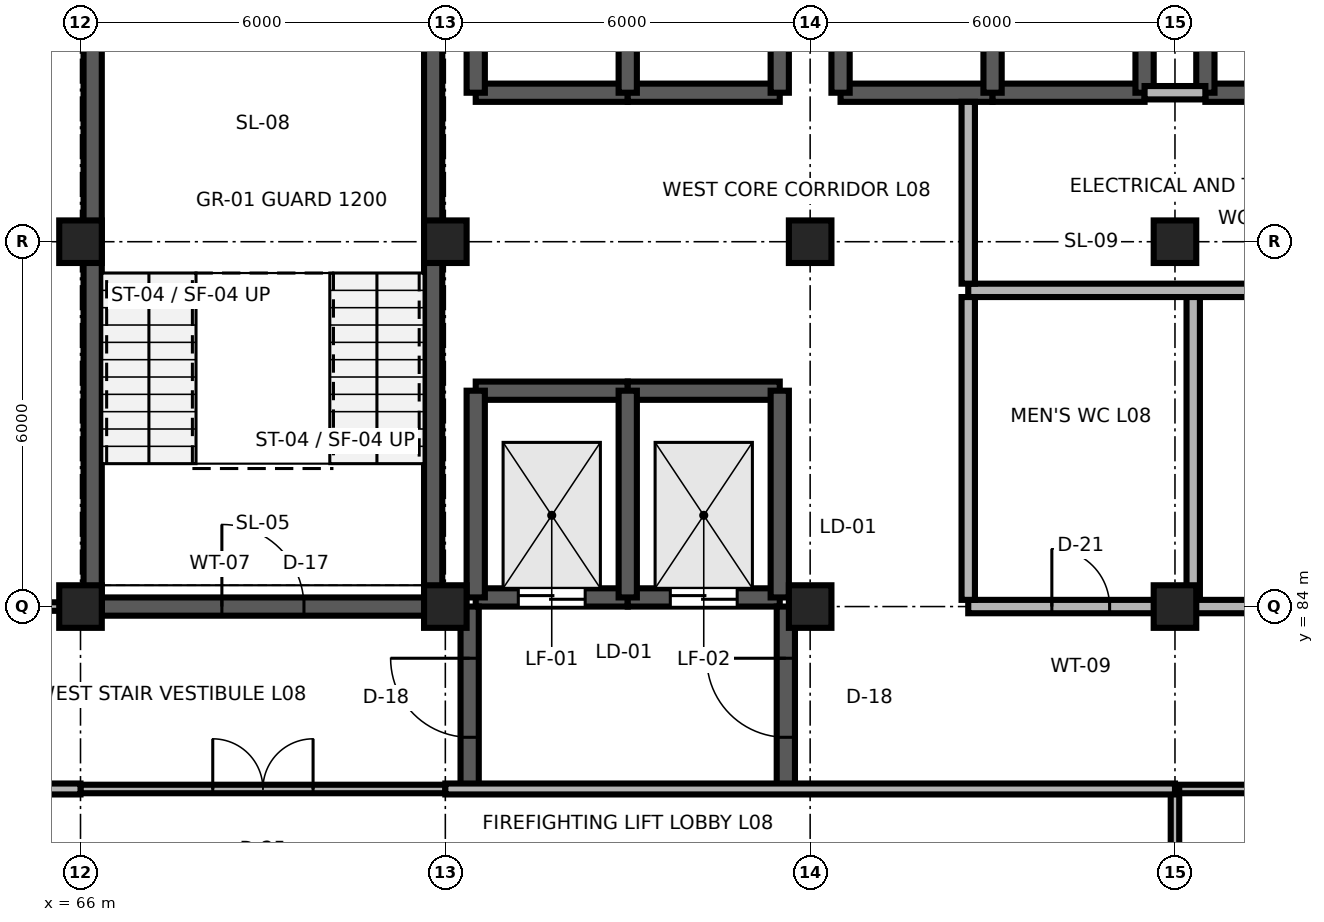
"""IFC4 building model, lengths in metres.
Left out: names, types, materials, properties, quantities, classifications, styles, units other than length and angle.
Written with IfcOpenShell. Run it as: python <this file> out.ifc"""

import sys

from ifc_helpers import new_model, si_unit, direction, frame, frame_2d, origin, origin_2d, place, context, subcontext, project, spatial, rectangle, extrude, element, fill, save


model = new_model("IFC4")
c1 = context("Model", 3, precision=1e-05, world=origin(), true_north=direction((0.0, 1.0)))
c2 = subcontext(c1, "Body", "Model", "MODEL_VIEW")
j1 = project(units=[si_unit("LENGTHUNIT", "METRE"), si_unit("PLANEANGLEUNIT", "RADIAN")], contexts=[c1])
p1 = place(None, origin())
s1 = spatial("IfcSite", under=j1, at=p1, CompositionType="ELEMENT")
p2 = place(p1, origin())
s2 = spatial("IfcBuilding", under=s1, at=p2, CompositionType="ELEMENT")
p3 = place(p2, frame((0.0, 0.0, 32.7)))
s3 = spatial("IfcBuildingStorey", under=s2, at=p3, CompositionType="ELEMENT", Elevation=32.7)
for number, where, z_axis, x_axis in (
    (1, (66.0, 84.0, 0.0), (0.0, 0.0, 1.0), (1.0, 0.0, 0.0)),
    (2, (72.0, 84.0, 0.0), (0.0, 0.0, 1.0), (1.0, 0.0, 0.0)),
    (3, (78.0, 84.0, 0.0), (0.0, 0.0, 1.0), (1.0, 0.0, 0.0)),
    (4, (84.0, 84.0, 0.0), (0.0, 0.0, 1.0), (1.0, 0.0, 0.0)),
    (5, (66.0, 90.0, 0.0), (0.0, 0.0, 1.0), (1.0, 0.0, 0.0)),
    (6, (72.0, 90.0, 0.0), (0.0, 0.0, 1.0), (1.0, 0.0, 0.0)),
    (7, (78.0, 90.0, 0.0), (0.0, 0.0, 1.0), (1.0, 0.0, 0.0)),
    (8, (84.0, 90.0, 0.0), (0.0, 0.0, 1.0), (1.0, 0.0, 0.0)),
):
    element("IfcColumn", number, at=place(p3, frame(where, z_axis=z_axis, x_axis=x_axis)), inside=s3, PredefinedType="COLUMN", context=c2, shape_type="SweptSolid", body=[
        extrude(rectangle(XDim=0.7, YDim=0.7, at=origin_2d()), origin(), (0.0, 0.0, 1.0), 3.9),
    ])
p4 = place(p3, frame((66.35, 84.0, 0.0), z_axis=(0.0, 0.0, 1.0), x_axis=(1.0, 0.0, 0.0)))
e9 = element("IfcWall", 9, at=p4, inside=s3, PredefinedType="SHEAR", context=c2, shape_type="SweptSolid", body=[
    extrude(rectangle(XDim=5.3, YDim=0.3, at=frame_2d((2.65, 0.0))), origin(), (0.0, 0.0, 1.0), 3.66),
])
p5 = place(p4, frame((1.975, 0.0, 0.0)))
e10 = element("IfcOpeningElement", 10, at=p5, cuts=e9, PredefinedType="OPENING", context=c2, shape_type="SweptSolid", body=[
    extrude(rectangle(XDim=1.35, YDim=2.2, at=frame_2d((0.675, 1.1))), frame((0.0, 0.165, 0.0), z_axis=(0.0, -1.0, 0.0), x_axis=(1.0, 0.0, 0.0)), (0.0, 0.0, 1.0), 0.33),
])
for number, where, z_axis, x_axis in (
    (11, (66.2, 84.0, 0.0), (0.0, 0.0, 1.0), (0.0, 1.0, 0.0)),
    (12, (71.8, 84.0, 0.0), (0.0, 0.0, 1.0), (0.0, 1.0, 0.0)),
):
    element("IfcWall", number, at=place(p3, frame(where, z_axis=z_axis, x_axis=x_axis)), inside=s3, PredefinedType="SHEAR", context=c2, shape_type="SweptSolid", body=[
        extrude(rectangle(XDim=11.8, YDim=0.3, at=frame_2d((5.9, 0.0))), origin(), (0.0, 0.0, 1.0), 3.74),
    ])
p6 = place(p3, frame((72.5, 84.15, 0.0), z_axis=(0.0, 0.0, 1.0), x_axis=(1.0, 0.0, 0.0)))
e13 = element("IfcWall", 13, at=p6, inside=s3, PredefinedType="SHEAR", context=c2, shape_type="SweptSolid", body=[
    extrude(rectangle(XDim=2.5, YDim=0.3, at=frame_2d((1.25, 0.0))), origin(), (0.0, 0.0, 1.0), 3.74),
])
p7 = place(p6, frame((0.7, 0.0, 0.0)))
e14 = element("IfcOpeningElement", 14, at=p7, cuts=e13, PredefinedType="OPENING", context=c2, shape_type="SweptSolid", body=[
    extrude(rectangle(XDim=1.1, YDim=2.1, at=frame_2d((0.55, 1.05))), frame((0.0, 0.165, 0.0), z_axis=(0.0, -1.0, 0.0), x_axis=(1.0, 0.0, 0.0)), (0.0, 0.0, 1.0), 0.33),
])
p8 = place(p3, frame((72.5, 87.55, 0.0), z_axis=(0.0, 0.0, 1.0), x_axis=(1.0, 0.0, 0.0)))
e15 = element("IfcWall", 15, at=p8, inside=s3, PredefinedType="SHEAR", context=c2, shape_type="SweptSolid", body=[
    extrude(rectangle(XDim=2.5, YDim=0.3, at=frame_2d((1.25, 0.0))), origin(), (0.0, 0.0, 1.0), 3.74),
])
p9 = place(p3, frame((72.5, 84.15, 0.0), z_axis=(0.0, 0.0, 1.0), x_axis=(0.0, 1.0, 0.0)))
e16 = element("IfcWall", 16, at=p9, inside=s3, PredefinedType="SHEAR", context=c2, shape_type="SweptSolid", body=[
    extrude(rectangle(XDim=3.4, YDim=0.3, at=frame_2d((1.7, 0.0))), origin(), (0.0, 0.0, 1.0), 3.74),
])
p10 = place(p3, frame((75.0, 84.15, 0.0), z_axis=(0.0, 0.0, 1.0), x_axis=(1.0, 0.0, 0.0)))
e17 = element("IfcWall", 17, at=p10, inside=s3, PredefinedType="SHEAR", context=c2, shape_type="SweptSolid", body=[
    extrude(rectangle(XDim=2.5, YDim=0.3, at=frame_2d((1.25, 0.0))), origin(), (0.0, 0.0, 1.0), 3.74),
])
p11 = place(p10, frame((0.7, 0.0, 0.0)))
e18 = element("IfcOpeningElement", 18, at=p11, cuts=e17, PredefinedType="OPENING", context=c2, shape_type="SweptSolid", body=[
    extrude(rectangle(XDim=1.1, YDim=2.1, at=frame_2d((0.55, 1.05))), frame((0.0, 0.165, 0.0), z_axis=(0.0, -1.0, 0.0), x_axis=(1.0, 0.0, 0.0)), (0.0, 0.0, 1.0), 0.33),
])
p12 = place(p3, frame((75.0, 87.55, 0.0), z_axis=(0.0, 0.0, 1.0), x_axis=(1.0, 0.0, 0.0)))
e19 = element("IfcWall", 19, at=p12, inside=s3, PredefinedType="SHEAR", context=c2, shape_type="SweptSolid", body=[
    extrude(rectangle(XDim=2.5, YDim=0.3, at=frame_2d((1.25, 0.0))), origin(), (0.0, 0.0, 1.0), 3.74),
])
for number, where, z_axis, x_axis in (
    (20, (75.0, 84.15, 0.0), (0.0, 0.0, 1.0), (0.0, 1.0, 0.0)),
    (21, (77.5, 84.15, 0.0), (0.0, 0.0, 1.0), (0.0, 1.0, 0.0)),
):
    element("IfcWall", number, at=place(p3, frame(where, z_axis=z_axis, x_axis=x_axis)), inside=s3, PredefinedType="SHEAR", context=c2, shape_type="SweptSolid", body=[
        extrude(rectangle(XDim=3.4, YDim=0.3, at=frame_2d((1.7, 0.0))), origin(), (0.0, 0.0, 1.0), 3.74),
    ])
p13 = place(p3, frame((72.5, 92.45, 0.0), z_axis=(0.0, 0.0, 1.0), x_axis=(1.0, 0.0, 0.0)))
e22 = element("IfcWall", 22, at=p13, inside=s3, PredefinedType="SHEAR", context=c2, shape_type="SweptSolid", body=[
    extrude(rectangle(XDim=2.5, YDim=0.3, at=frame_2d((1.25, 0.0))), origin(), (0.0, 0.0, 1.0), 3.74),
])
p14 = place(p3, frame((72.5, 92.45, 0.0), z_axis=(0.0, 0.0, 1.0), x_axis=(0.0, 1.0, 0.0)))
e23 = element("IfcWall", 23, at=p14, inside=s3, PredefinedType="SHEAR", context=c2, shape_type="SweptSolid", body=[
    extrude(rectangle(XDim=3.4, YDim=0.3, at=frame_2d((1.7, 0.0))), origin(), (0.0, 0.0, 1.0), 3.74),
])
p15 = place(p3, frame((75.0, 92.45, 0.0), z_axis=(0.0, 0.0, 1.0), x_axis=(1.0, 0.0, 0.0)))
e24 = element("IfcWall", 24, at=p15, inside=s3, PredefinedType="SHEAR", context=c2, shape_type="SweptSolid", body=[
    extrude(rectangle(XDim=2.5, YDim=0.3, at=frame_2d((1.25, 0.0))), origin(), (0.0, 0.0, 1.0), 3.74),
])
for number, where, z_axis, x_axis in (
    (25, (75.0, 92.45, 0.0), (0.0, 0.0, 1.0), (0.0, 1.0, 0.0)),
    (26, (77.5, 92.45, 0.0), (0.0, 0.0, 1.0), (0.0, 1.0, 0.0)),
):
    element("IfcWall", number, at=place(p3, frame(where, z_axis=z_axis, x_axis=x_axis)), inside=s3, PredefinedType="SHEAR", context=c2, shape_type="SweptSolid", body=[
        extrude(rectangle(XDim=3.4, YDim=0.3, at=frame_2d((1.7, 0.0))), origin(), (0.0, 0.0, 1.0), 3.74),
    ])
p16 = place(p3, frame((78.5, 92.45, 0.0), z_axis=(0.0, 0.0, 1.0), x_axis=(1.0, 0.0, 0.0)))
e27 = element("IfcWall", 27, at=p16, inside=s3, PredefinedType="SHEAR", context=c2, shape_type="SweptSolid", body=[
    extrude(rectangle(XDim=2.5, YDim=0.3, at=frame_2d((1.25, 0.0))), origin(), (0.0, 0.0, 1.0), 3.74),
])
p17 = place(p3, frame((78.5, 92.45, 0.0), z_axis=(0.0, 0.0, 1.0), x_axis=(0.0, 1.0, 0.0)))
e28 = element("IfcWall", 28, at=p17, inside=s3, PredefinedType="SHEAR", context=c2, shape_type="SweptSolid", body=[
    extrude(rectangle(XDim=3.4, YDim=0.3, at=frame_2d((1.7, 0.0))), origin(), (0.0, 0.0, 1.0), 3.74),
])
p18 = place(p3, frame((81.0, 92.45, 0.0), z_axis=(0.0, 0.0, 1.0), x_axis=(1.0, 0.0, 0.0)))
e29 = element("IfcWall", 29, at=p18, inside=s3, PredefinedType="SHEAR", context=c2, shape_type="SweptSolid", body=[
    extrude(rectangle(XDim=2.5, YDim=0.3, at=frame_2d((1.25, 0.0))), origin(), (0.0, 0.0, 1.0), 3.74),
])
for number, where, z_axis, x_axis in (
    (30, (81.0, 92.45, 0.0), (0.0, 0.0, 1.0), (0.0, 1.0, 0.0)),
    (31, (83.5, 92.45, 0.0), (0.0, 0.0, 1.0), (0.0, 1.0, 0.0)),
):
    element("IfcWall", number, at=place(p3, frame(where, z_axis=z_axis, x_axis=x_axis)), inside=s3, PredefinedType="SHEAR", context=c2, shape_type="SweptSolid", body=[
        extrude(rectangle(XDim=3.4, YDim=0.3, at=frame_2d((1.7, 0.0))), origin(), (0.0, 0.0, 1.0), 3.74),
    ])
p19 = place(p3, frame((84.5, 92.45, 0.0), z_axis=(0.0, 0.0, 1.0), x_axis=(1.0, 0.0, 0.0)))
e32 = element("IfcWall", 32, at=p19, inside=s3, PredefinedType="SHEAR", context=c2, shape_type="SweptSolid", body=[
    extrude(rectangle(XDim=2.5, YDim=0.3, at=frame_2d((1.25, 0.0))), origin(), (0.0, 0.0, 1.0), 3.74),
])
p20 = place(p3, frame((84.5, 92.45, 0.0), z_axis=(0.0, 0.0, 1.0), x_axis=(0.0, 1.0, 0.0)))
e33 = element("IfcWall", 33, at=p20, inside=s3, PredefinedType="SHEAR", context=c2, shape_type="SweptSolid", body=[
    extrude(rectangle(XDim=3.4, YDim=0.3, at=frame_2d((1.7, 0.0))), origin(), (0.0, 0.0, 1.0), 3.74),
])
p21 = place(p3, frame((72.4, 81.0, 0.0), z_axis=(0.0, 0.0, 1.0), x_axis=(0.0, 1.0, 0.0)))
e34 = element("IfcWall", 34, at=p21, inside=s3, PredefinedType="SHEAR", context=c2, shape_type="SweptSolid", body=[
    extrude(rectangle(XDim=3.0, YDim=0.3, at=frame_2d((1.5, 0.0))), origin(), (0.0, 0.0, 1.0), 3.4),
])
p22 = place(p21, frame((0.85, 0.0, 0.0)))
e35 = element("IfcOpeningElement", 35, at=p22, cuts=e34, PredefinedType="OPENING", context=c2, shape_type="SweptSolid", body=[
    extrude(rectangle(XDim=1.3, YDim=2.2, at=frame_2d((0.65, 1.1))), frame((0.0, 0.165, 0.0), z_axis=(0.0, -1.0, 0.0), x_axis=(1.0, 0.0, 0.0)), (0.0, 0.0, 1.0), 0.33),
])
p23 = place(p3, frame((77.6, 81.0, 0.0), z_axis=(0.0, 0.0, 1.0), x_axis=(0.0, 1.0, 0.0)))
e36 = element("IfcWall", 36, at=p23, inside=s3, PredefinedType="SHEAR", context=c2, shape_type="SweptSolid", body=[
    extrude(rectangle(XDim=3.0, YDim=0.3, at=frame_2d((1.5, 0.0))), origin(), (0.0, 0.0, 1.0), 3.4),
])
p24 = place(p23, frame((0.85, 0.0, 0.0)))
e37 = element("IfcOpeningElement", 37, at=p24, cuts=e36, PredefinedType="OPENING", context=c2, shape_type="SweptSolid", body=[
    extrude(rectangle(XDim=1.3, YDim=2.2, at=frame_2d((0.65, 1.1))), frame((0.0, 0.165, 0.0), z_axis=(0.0, -1.0, 0.0), x_axis=(1.0, 0.0, 0.0)), (0.0, 0.0, 1.0), 0.33),
])
p25 = place(p3, frame((80.6, 84.0, 0.0), z_axis=(0.0, 0.0, 1.0), x_axis=(1.0, 0.0, 0.0)))
e38 = element("IfcWall", 38, at=p25, inside=s3, PredefinedType="PARTITIONING", context=c2, shape_type="SweptSolid", body=[
    extrude(rectangle(XDim=3.7, YDim=0.22, at=frame_2d((1.85, 0.0))), origin(), (0.0, 0.0, 1.0), 3.012),
])
p26 = place(p25, frame((1.375, 0.0, 0.0)))
e39 = element("IfcOpeningElement", 39, at=p26, cuts=e38, PredefinedType="OPENING", context=c2, shape_type="SweptSolid", body=[
    extrude(rectangle(XDim=0.95, YDim=2.15, at=frame_2d((0.475, 1.075))), frame((0.0, 0.125, 0.0), z_axis=(0.0, -1.0, 0.0), x_axis=(1.0, 0.0, 0.0)), (0.0, 0.0, 1.0), 0.25),
])
p27 = place(p3, frame((84.3, 84.0, 0.0), z_axis=(0.0, 0.0, 1.0), x_axis=(1.0, 0.0, 0.0)))
e40 = element("IfcWall", 40, at=p27, inside=s3, PredefinedType="PARTITIONING", context=c2, shape_type="SweptSolid", body=[
    extrude(rectangle(XDim=3.5, YDim=0.22, at=frame_2d((1.75, 0.0))), origin(), (0.0, 0.0, 1.0), 3.012),
])
p28 = place(p27, frame((1.275, 0.0, 0.0)))
e41 = element("IfcOpeningElement", 41, at=p28, cuts=e40, PredefinedType="OPENING", context=c2, shape_type="SweptSolid", body=[
    extrude(rectangle(XDim=0.95, YDim=2.1, at=frame_2d((0.475, 1.05))), frame((0.0, 0.125, 0.0), z_axis=(0.0, -1.0, 0.0), x_axis=(1.0, 0.0, 0.0)), (0.0, 0.0, 1.0), 0.25),
])
p29 = place(p3, frame((84.3, 84.15, 0.0), z_axis=(0.0, 0.0, 1.0), x_axis=(0.0, 1.0, 0.0)))
e42 = element("IfcWall", 42, at=p29, inside=s3, PredefinedType="PARTITIONING", context=c2, shape_type="SweptSolid", body=[
    extrude(rectangle(XDim=5.0, YDim=0.22, at=frame_2d((2.5, 0.0))), origin(), (0.0, 0.0, 1.0), 3.4),
])
p30 = place(p3, frame((80.6, 89.2, 0.0), z_axis=(0.0, 0.0, 1.0), x_axis=(1.0, 0.0, 0.0)))
e43 = element("IfcWall", 43, at=p30, inside=s3, PredefinedType="PARTITIONING", context=c2, shape_type="SweptSolid", body=[
    extrude(rectangle(XDim=9.87, YDim=0.22, at=frame_2d((4.935, 0.0))), origin(), (0.0, 0.0, 1.0), 3.4),
])
p31 = place(p3, frame((66.0, 81.0, 0.0), z_axis=(0.0, 0.0, 1.0), x_axis=(1.0, 0.0, 0.0)))
e44 = element("IfcWall", 44, at=p31, inside=s3, PredefinedType="PARTITIONING", context=c2, shape_type="SweptSolid", body=[
    extrude(rectangle(XDim=6.0, YDim=0.14, at=frame_2d((3.0, 0.0))), origin(), (0.0, 0.0, 1.0), 3.4),
])
p32 = place(p31, frame((2.175, 0.0, 0.0)))
e45 = element("IfcOpeningElement", 45, at=p32, cuts=e44, PredefinedType="OPENING", context=c2, shape_type="SweptSolid", body=[
    extrude(rectangle(XDim=1.65, YDim=2.35, at=frame_2d((0.825, 1.175))), frame((0.0, 0.085, 0.0), z_axis=(0.0, -1.0, 0.0), x_axis=(1.0, 0.0, 0.0)), (0.0, 0.0, 1.0), 0.17),
])
p33 = place(p3, frame((84.0, 81.0, 0.0), z_axis=(0.0, 0.0, 1.0), x_axis=(1.0, 0.0, 0.0)))
e46 = element("IfcWall", 46, at=p33, inside=s3, PredefinedType="PARTITIONING", context=c2, shape_type="SweptSolid", body=[
    extrude(rectangle(XDim=12.0, YDim=0.14, at=frame_2d((6.0, 0.0))), origin(), (0.0, 0.0, 1.0), 3.4),
])
p34 = place(p33, frame((5.15, 0.0, 0.0)))
e47 = element("IfcOpeningElement", 47, at=p34, cuts=e46, PredefinedType="OPENING", context=c2, shape_type="SweptSolid", body=[
    extrude(rectangle(XDim=1.7, YDim=2.45, at=frame_2d((0.85, 1.225))), frame((0.0, 0.085, 0.0), z_axis=(0.0, -1.0, 0.0), x_axis=(1.0, 0.0, 0.0)), (0.0, 0.0, 1.0), 0.17),
])
p35 = place(p3, frame((60.0, 84.0, 0.0), z_axis=(0.0, 0.0, 1.0), x_axis=(1.0, 0.0, 0.0)))
e48 = element("IfcWall", 48, at=p35, inside=s3, PredefinedType="PARTITIONING", context=c2, shape_type="SweptSolid", body=[
    extrude(rectangle(XDim=6.0, YDim=0.14, at=frame_2d((3.0, 0.0))), origin(), (0.0, 0.0, 1.0), 3.012),
])
p36 = place(p35, frame((2.475, 0.0, 0.0)))
e49 = element("IfcOpeningElement", 49, at=p36, cuts=e48, PredefinedType="OPENING", context=c2, shape_type="SweptSolid", body=[
    extrude(rectangle(XDim=1.05, YDim=2.25, at=frame_2d((0.525, 1.125))), frame((0.0, 0.085, 0.0), z_axis=(0.0, -1.0, 0.0), x_axis=(1.0, 0.0, 0.0)), (0.0, 0.0, 1.0), 0.17),
])
p37 = place(p3, frame((84.0, 72.65, 0.0), z_axis=(0.0, 0.0, 1.0), x_axis=(0.0, 1.0, 0.0)))
e50 = element("IfcWall", 50, at=p37, inside=s3, PredefinedType="PARTITIONING", context=c2, shape_type="SweptSolid", body=[
    extrude(rectangle(XDim=8.35, YDim=0.14, at=frame_2d((4.175, 0.0))), origin(), (0.0, 0.0, 1.0), 3.012),
])
p38 = place(p3, frame((80.6, 84.11, 0.0), z_axis=(0.0, 0.0, 1.0), x_axis=(0.0, 1.0, 0.0)))
e51 = element("IfcWall", 51, at=p38, inside=s3, PredefinedType="PARTITIONING", context=c2, shape_type="SweptSolid", body=[
    extrude(rectangle(XDim=4.98, YDim=0.22, at=frame_2d((2.49, 0.0))), origin(), (0.0, 0.0, 1.0), 3.4),
])
p39 = place(p3, frame((80.6, 89.31, 0.0), z_axis=(0.0, 0.0, 1.0), x_axis=(0.0, 1.0, 0.0)))
e52 = element("IfcWall", 52, at=p39, inside=s3, PredefinedType="PARTITIONING", context=c2, shape_type="SweptSolid", body=[
    extrude(rectangle(XDim=2.99, YDim=0.22, at=frame_2d((1.495, 0.0))), origin(), (0.0, 0.0, 1.0), 3.4),
])
p40 = place(p3, frame((83.5, 92.45, 0.0), z_axis=(0.0, 0.0, 1.0), x_axis=(1.0, 0.0, 0.0)))
e53 = element("IfcWall", 53, at=p40, inside=s3, PredefinedType="PARTITIONING", context=c2, shape_type="SweptSolid", body=[
    extrude(rectangle(XDim=1.0, YDim=0.22, at=frame_2d((0.5, 0.0))), origin(), (0.0, 0.0, 1.0), 3.4),
])
p41 = place(p3, frame((55.7, 81.0, 0.0), z_axis=(0.0, 0.0, 1.0), x_axis=(1.0, 0.0, 0.0)))
e54 = element("IfcWall", 54, at=p41, inside=s3, PredefinedType="PARTITIONING", context=c2, shape_type="SweptSolid", body=[
    extrude(rectangle(XDim=10.3, YDim=0.18, at=frame_2d((5.15, 0.0))), origin(), (0.0, 0.0, 1.0), 3.4),
])
p42 = place(p3, frame((72.0, 81.0, 0.0), z_axis=(0.0, 0.0, 1.0), x_axis=(1.0, 0.0, 0.0)))
e55 = element("IfcWall", 55, at=p42, inside=s3, PredefinedType="PARTITIONING", context=c2, shape_type="SweptSolid", body=[
    extrude(rectangle(XDim=12.0, YDim=0.18, at=frame_2d((6.0, 0.0))), origin(), (0.0, 0.0, 1.0), 3.4),
])
p43 = place(p5, origin())
e56 = element("IfcDoor", 56, at=p43, inside=s3, OperationType="SINGLE_SWING_LEFT", PredefinedType="DOOR", context=c2, shape_type="SweptSolid", body=[
    extrude(rectangle(XDim=1.35, YDim=2.2, at=frame_2d((0.675, 1.1))), frame((0.0, 0.025, 0.0), z_axis=(0.0, -1.0, 0.0), x_axis=(1.0, 0.0, 0.0)), (0.0, 0.0, 1.0), 0.05),
])
fill(e10, e56)
p44 = place(p7, origin())
e57 = element("IfcDoor", 57, at=p44, inside=s3, OperationType="DOUBLE_DOOR_SLIDING", PredefinedType="DOOR", context=c2, shape_type="SweptSolid", body=[
    extrude(rectangle(XDim=1.1, YDim=2.1, at=frame_2d((0.55, 1.05))), frame((0.0, 0.025, 0.0), z_axis=(0.0, -1.0, 0.0), x_axis=(1.0, 0.0, 0.0)), (0.0, 0.0, 1.0), 0.05),
])
fill(e14, e57)
p45 = place(p11, origin())
e58 = element("IfcDoor", 58, at=p45, inside=s3, OperationType="DOUBLE_DOOR_SLIDING", PredefinedType="DOOR", context=c2, shape_type="SweptSolid", body=[
    extrude(rectangle(XDim=1.1, YDim=2.1, at=frame_2d((0.55, 1.05))), frame((0.0, 0.025, 0.0), z_axis=(0.0, -1.0, 0.0), x_axis=(1.0, 0.0, 0.0)), (0.0, 0.0, 1.0), 0.05),
])
fill(e18, e58)
p46 = place(p22, origin())
e59 = element("IfcDoor", 59, at=p46, inside=s3, OperationType="SINGLE_SWING_RIGHT", PredefinedType="DOOR", context=c2, shape_type="SweptSolid", body=[
    extrude(rectangle(XDim=1.3, YDim=2.2, at=frame_2d((0.65, 1.1))), frame((0.0, 0.025, 0.0), z_axis=(0.0, -1.0, 0.0), x_axis=(1.0, 0.0, 0.0)), (0.0, 0.0, 1.0), 0.05),
])
fill(e35, e59)
p47 = place(p24, origin())
e60 = element("IfcDoor", 60, at=p47, inside=s3, OperationType="SINGLE_SWING_RIGHT", PredefinedType="DOOR", context=c2, shape_type="SweptSolid", body=[
    extrude(rectangle(XDim=1.3, YDim=2.2, at=frame_2d((0.65, 1.1))), frame((0.0, 0.025, 0.0), z_axis=(0.0, -1.0, 0.0), x_axis=(1.0, 0.0, 0.0)), (0.0, 0.0, 1.0), 0.05),
])
fill(e37, e60)
p48 = place(p26, origin())
e61 = element("IfcDoor", 61, at=p48, inside=s3, OperationType="SINGLE_SWING_LEFT", PredefinedType="DOOR", context=c2, shape_type="SweptSolid", body=[
    extrude(rectangle(XDim=0.95, YDim=2.15, at=frame_2d((0.475, 1.075))), frame((0.0, 0.025, 0.0), z_axis=(0.0, -1.0, 0.0), x_axis=(1.0, 0.0, 0.0)), (0.0, 0.0, 1.0), 0.05),
])
fill(e39, e61)
p49 = place(p32, origin())
e62 = element("IfcDoor", 62, at=p49, inside=s3, OperationType="DOUBLE_DOOR_SINGLE_SWING", PredefinedType="DOOR", context=c2, shape_type="SweptSolid", body=[
    extrude(rectangle(XDim=1.65, YDim=2.35, at=frame_2d((0.825, 1.175))), frame((0.0, 0.025, 0.0), z_axis=(0.0, -1.0, 0.0), x_axis=(1.0, 0.0, 0.0)), (0.0, 0.0, 1.0), 0.05),
])
fill(e45, e62)
save(model, sys.argv[1])
